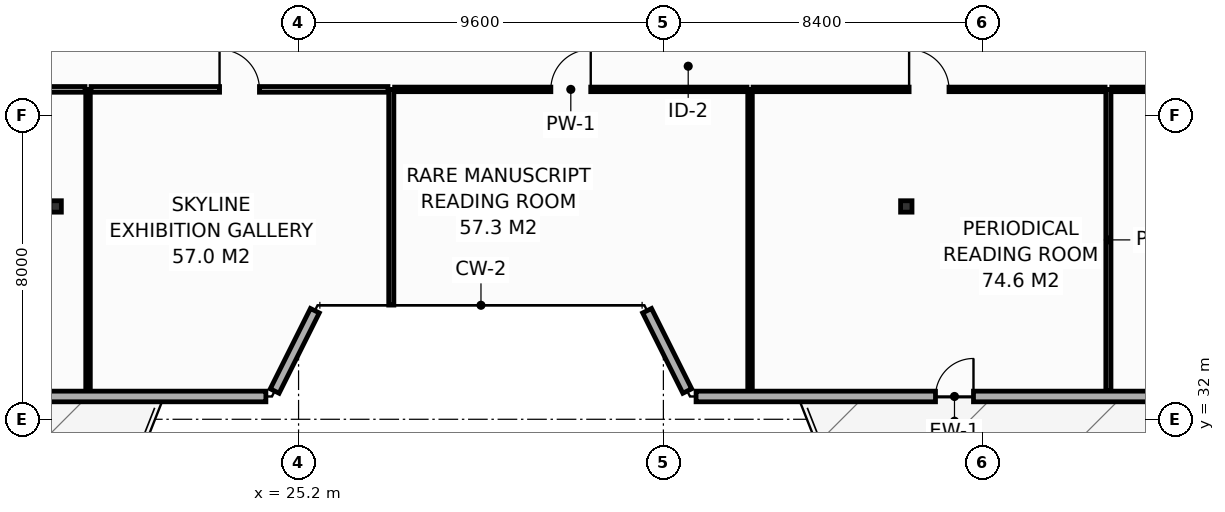
"""IFC4 building model, lengths in metres.
Left out: names, types, materials, properties, quantities, classifications, styles, units other than length and angle.
Written with IfcOpenShell. Run it as: python <this file> out.ifc"""

import sys

from ifc_helpers import new_model, si_unit, direction, frame, frame_2d, origin, origin_2d, place, context, subcontext, project, spatial, rectangle, hollow_rectangle, extrude, element, fill, save


model = new_model("IFC4")
c1 = context("Model", 3, precision=1e-05, world=origin(), true_north=direction((0.0, 1.0)))
c2 = subcontext(c1, "Body", "Model", "MODEL_VIEW")
j1 = project(units=[si_unit("LENGTHUNIT", "METRE"), si_unit("PLANEANGLEUNIT", "RADIAN")], contexts=[c1])
p1 = place(None, origin())
s1 = spatial("IfcSite", under=j1, at=p1, CompositionType="ELEMENT")
p2 = place(p1, origin())
s2 = spatial("IfcBuilding", under=s1, at=p2, CompositionType="ELEMENT")
p3 = place(p2, frame((0.0, 0.0, 295.2)))
s3 = spatial("IfcBuildingStorey", under=s2, at=p3, CompositionType="ELEMENT", Elevation=295.2)
for number, where, z_axis, x_axis in (
    (1, (18.808, 37.6, 0.0), (0.0, 0.0, 1.0), (1.0, 0.0, 0.0)),
    (2, (41.192, 37.6, 0.0), (0.0, 0.0, 1.0), (1.0, 0.0, 0.0)),
):
    element("IfcColumn", number, at=place(p3, frame(where, z_axis=z_axis, x_axis=x_axis)), inside=s3, PredefinedType="COLUMN", context=c2, shape_type="SweptSolid", body=[
        extrude(hollow_rectangle(XDim=0.3, YDim=0.3, WallThickness=0.012, at=origin_2d()), origin(), (0.0, 0.0, 1.0), 3.8),
    ])
p4 = place(p3, frame((10.74, 32.6, 0.0), z_axis=(0.0, 0.0, 1.0), x_axis=(1.0, 0.0, 0.0)))
e3 = element("IfcWall", 3, at=p4, inside=s3, PredefinedType="STANDARD", context=c2, shape_type="SweptSolid", body=[
    extrude(rectangle(XDim=13.6, YDim=0.28, at=frame_2d((6.8, 0.0))), origin(), (0.0, 0.0, 1.0), 3.55),
])
p5 = place(p4, frame((6.3, 0.0, 0.0)))
e4 = element("IfcOpeningElement", 4, at=p5, cuts=e3, PredefinedType="OPENING", context=c2, shape_type="SweptSolid", body=[
    extrude(rectangle(XDim=1.0, YDim=2.2, at=frame_2d((0.5, 1.1))), frame((0.0, 0.15, 0.0), z_axis=(0.0, -1.0, 0.0), x_axis=(1.0, 0.0, 0.0)), (0.0, 0.0, 1.0), 0.3),
])
for number, where, z_axis, x_axis in (
    (5, (24.572, 32.743, 0.0), (0.0, 0.0, 1.0), (0.447, 0.894, 0.0)),
    (6, (34.372, 34.857, 0.0), (0.0, 0.0, 1.0), (0.447, -0.894, 0.0)),
):
    element("IfcWall", number, at=place(p3, frame(where, z_axis=z_axis, x_axis=x_axis)), inside=s3, PredefinedType="STANDARD", context=c2, shape_type="SweptSolid", body=[
        extrude(rectangle(XDim=2.363, YDim=0.26, at=frame_2d((1.182, 0.0))), origin(), (0.0, 0.0, 1.0), 3.55),
    ])
p6 = place(p3, frame((35.66, 32.6, 0.0), z_axis=(0.0, 0.0, 1.0), x_axis=(1.0, 0.0, 0.0)))
e7 = element("IfcWall", 7, at=p6, inside=s3, PredefinedType="STANDARD", context=c2, shape_type="SweptSolid", body=[
    extrude(rectangle(XDim=13.6, YDim=0.28, at=frame_2d((6.8, 0.0))), origin(), (0.0, 0.0, 1.0), 3.55),
])
p7 = place(p6, frame((6.3, 0.0, 0.0)))
e8 = element("IfcOpeningElement", 8, at=p7, cuts=e7, PredefinedType="OPENING", context=c2, shape_type="SweptSolid", body=[
    extrude(rectangle(XDim=1.0, YDim=2.2, at=frame_2d((0.5, 1.1))), frame((0.0, 0.15, 0.0), z_axis=(0.0, -1.0, 0.0), x_axis=(1.0, 0.0, 0.0)), (0.0, 0.0, 1.0), 0.3),
])
p8 = place(p3, frame((19.66, 32.76, 0.0), z_axis=(0.0, 0.0, 1.0), x_axis=(0.0, 1.0, 0.0)))
e9 = element("IfcWall", 9, at=p8, inside=s3, PredefinedType="PARTITIONING", context=c2, shape_type="SweptSolid", body=[
    extrude(rectangle(XDim=7.92, YDim=0.12, at=frame_2d((3.96, 0.0))), origin(), (0.0, 0.0, 1.0), 3.047),
])
p9 = place(p3, frame((27.64, 35.005, 0.0), z_axis=(0.0, 0.0, 1.0), x_axis=(0.0, 1.0, 0.0)))
e10 = element("IfcWall", 10, at=p9, inside=s3, PredefinedType="PARTITIONING", context=c2, shape_type="SweptSolid", body=[
    extrude(rectangle(XDim=5.675, YDim=0.135, at=frame_2d((2.837, 0.0))), origin(), (0.0, 0.0, 1.0), 3.55),
])
p10 = place(p3, frame((37.08, 32.76, 0.0), z_axis=(0.0, 0.0, 1.0), x_axis=(0.0, 1.0, 0.0)))
e11 = element("IfcWall", 11, at=p10, inside=s3, PredefinedType="PARTITIONING", context=c2, shape_type="SweptSolid", body=[
    extrude(rectangle(XDim=7.92, YDim=0.12, at=frame_2d((3.96, 0.0))), origin(), (0.0, 0.0, 1.0), 3.55),
])
p11 = place(p3, frame((46.51, 32.76, 0.0), z_axis=(0.0, 0.0, 1.0), x_axis=(0.0, 1.0, 0.0)))
e12 = element("IfcWall", 12, at=p11, inside=s3, PredefinedType="PARTITIONING", context=c2, shape_type="SweptSolid", body=[
    extrude(rectangle(XDim=7.92, YDim=0.135, at=frame_2d((3.96, 0.0))), origin(), (0.0, 0.0, 1.0), 3.047),
])
p12 = place(p3, frame((6.415, 40.68, 0.0), z_axis=(0.0, 0.0, 1.0), x_axis=(1.0, 0.0, 0.0)))
e13 = element("IfcWall", 13, at=p12, inside=s3, PredefinedType="PARTITIONING", context=c2, shape_type="SweptSolid", body=[
    extrude(rectangle(XDim=13.165, YDim=0.15, at=frame_2d((6.583, 0.0))), origin(), (0.0, 0.0, 1.0), 3.085),
])
p13 = place(p12, frame((6.058, 0.0, 0.0)))
e14 = element("IfcOpeningElement", 14, at=p13, cuts=e13, PredefinedType="OPENING", context=c2, shape_type="SweptSolid", body=[
    extrude(rectangle(XDim=1.05, YDim=2.15, at=frame_2d((0.525, 1.075))), frame((0.0, 0.085, 0.0), z_axis=(0.0, -1.0, 0.0), x_axis=(1.0, 0.0, 0.0)), (0.0, 0.0, 1.0), 0.17),
])
p14 = place(p3, frame((19.74, 40.68, 0.0), z_axis=(0.0, 0.0, 1.0), x_axis=(1.0, 0.0, 0.0)))
e15 = element("IfcWall", 15, at=p14, inside=s3, PredefinedType="PARTITIONING", context=c2, shape_type="SweptSolid", body=[
    extrude(rectangle(XDim=7.812, YDim=0.15, at=frame_2d((3.906, 0.0))), origin(), (0.0, 0.0, 1.0), 3.047),
])
p15 = place(p14, frame((3.381, 0.0, 0.0)))
e16 = element("IfcOpeningElement", 16, at=p15, cuts=e15, PredefinedType="OPENING", context=c2, shape_type="SweptSolid", body=[
    extrude(rectangle(XDim=1.05, YDim=2.15, at=frame_2d((0.525, 1.075))), frame((0.0, 0.085, 0.0), z_axis=(0.0, -1.0, 0.0), x_axis=(1.0, 0.0, 0.0)), (0.0, 0.0, 1.0), 0.17),
])
p16 = place(p3, frame((27.728, 40.68, 0.0), z_axis=(0.0, 0.0, 1.0), x_axis=(1.0, 0.0, 0.0)))
e17 = element("IfcWall", 17, at=p16, inside=s3, PredefinedType="PARTITIONING", context=c2, shape_type="SweptSolid", body=[
    extrude(rectangle(XDim=9.272, YDim=0.12, at=frame_2d((4.636, 0.0))), origin(), (0.0, 0.0, 1.0), 3.55),
])
p17 = place(p16, frame((4.111, 0.0, 0.0)))
e18 = element("IfcOpeningElement", 18, at=p17, cuts=e17, PredefinedType="OPENING", context=c2, shape_type="SweptSolid", body=[
    extrude(rectangle(XDim=1.05, YDim=2.15, at=frame_2d((0.525, 1.075))), frame((0.0, 0.07, 0.0), z_axis=(0.0, -1.0, 0.0), x_axis=(1.0, 0.0, 0.0)), (0.0, 0.0, 1.0), 0.14),
])
p18 = place(p3, frame((37.16, 40.68, 0.0), z_axis=(0.0, 0.0, 1.0), x_axis=(1.0, 0.0, 0.0)))
e19 = element("IfcWall", 19, at=p18, inside=s3, PredefinedType="PARTITIONING", context=c2, shape_type="SweptSolid", body=[
    extrude(rectangle(XDim=9.263, YDim=0.12, at=frame_2d((4.631, 0.0))), origin(), (0.0, 0.0, 1.0), 3.047),
])
p19 = place(p18, frame((4.106, 0.0, 0.0)))
e20 = element("IfcOpeningElement", 20, at=p19, cuts=e19, PredefinedType="OPENING", context=c2, shape_type="SweptSolid", body=[
    extrude(rectangle(XDim=1.05, YDim=2.15, at=frame_2d((0.525, 1.075))), frame((0.0, 0.07, 0.0), z_axis=(0.0, -1.0, 0.0), x_axis=(1.0, 0.0, 0.0)), (0.0, 0.0, 1.0), 0.14),
])
p20 = place(p3, frame((46.597, 40.68, 0.0), z_axis=(0.0, 0.0, 1.0), x_axis=(1.0, 0.0, 0.0)))
e21 = element("IfcWall", 21, at=p20, inside=s3, PredefinedType="PARTITIONING", context=c2, shape_type="SweptSolid", body=[
    extrude(rectangle(XDim=6.988, YDim=0.12, at=frame_2d((3.494, 0.0))), origin(), (0.0, 0.0, 1.0), 3.085),
])
p21 = place(p20, frame((3.044, 0.0, 0.0)))
e22 = element("IfcOpeningElement", 22, at=p21, cuts=e21, PredefinedType="OPENING", context=c2, shape_type="SweptSolid", body=[
    extrude(rectangle(XDim=0.9, YDim=2.1, at=frame_2d((0.45, 1.05))), frame((0.0, 0.07, 0.0), z_axis=(0.0, -1.0, 0.0), x_axis=(1.0, 0.0, 0.0)), (0.0, 0.0, 1.0), 0.14),
])
p22 = place(p7, origin())
e23 = element("IfcDoor", 23, at=p22, inside=s3, OperationType="SINGLE_SWING_RIGHT", PredefinedType="DOOR", context=c2, shape_type="SweptSolid", body=[
    extrude(rectangle(XDim=1.0, YDim=2.2, at=frame_2d((0.5, 1.1))), frame((0.0, 0.025, 0.0), z_axis=(0.0, -1.0, 0.0), x_axis=(1.0, 0.0, 0.0)), (0.0, 0.0, 1.0), 0.05),
])
fill(e8, e23)
p23 = place(p15, origin())
e24 = element("IfcDoor", 24, at=p23, inside=s3, OperationType="SINGLE_SWING_LEFT", PredefinedType="DOOR", context=c2, shape_type="SweptSolid", body=[
    extrude(rectangle(XDim=1.05, YDim=2.15, at=frame_2d((0.525, 1.075))), frame((0.0, 0.025, 0.0), z_axis=(0.0, -1.0, 0.0), x_axis=(1.0, 0.0, 0.0)), (0.0, 0.0, 1.0), 0.05),
])
fill(e16, e24)
p24 = place(p17, origin())
e25 = element("IfcDoor", 25, at=p24, inside=s3, OperationType="SINGLE_SWING_RIGHT", PredefinedType="DOOR", context=c2, shape_type="SweptSolid", body=[
    extrude(rectangle(XDim=1.05, YDim=2.15, at=frame_2d((0.525, 1.075))), frame((0.0, 0.025, 0.0), z_axis=(0.0, -1.0, 0.0), x_axis=(1.0, 0.0, 0.0)), (0.0, 0.0, 1.0), 0.05),
])
fill(e18, e25)
p25 = place(p19, origin())
e26 = element("IfcDoor", 26, at=p25, inside=s3, OperationType="SINGLE_SWING_LEFT", PredefinedType="DOOR", context=c2, shape_type="SweptSolid", body=[
    extrude(rectangle(XDim=1.05, YDim=2.15, at=frame_2d((0.525, 1.075))), frame((0.0, 0.025, 0.0), z_axis=(0.0, -1.0, 0.0), x_axis=(1.0, 0.0, 0.0)), (0.0, 0.0, 1.0), 0.05),
])
fill(e20, e26)
save(model, sys.argv[1])
